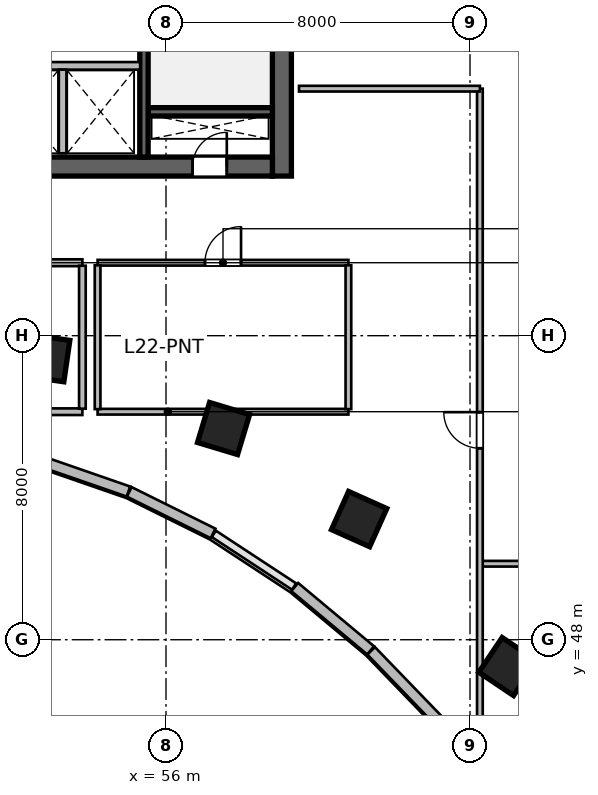
"""IFC4 building model, lengths in metres.
Left out: names, types, materials, properties, quantities, classifications, styles, units other than length and angle.
Written with IfcOpenShell. Run it as: python <this file> out.ifc"""

import sys

from ifc_helpers import new_model, si_unit, direction, frame, frame_2d, origin, origin_2d, place, context, subcontext, project, spatial, rectangle, extrude, source, transform, mapped, element, fill, save


model = new_model("IFC4")
c1 = context("Model", 3, precision=1e-05, world=origin(), true_north=direction((0.0, 1.0)))
c2 = subcontext(c1, "Body", "Model", "MODEL_VIEW")
j1 = project(units=[si_unit("LENGTHUNIT", "METRE"), si_unit("PLANEANGLEUNIT", "RADIAN")], contexts=[c1])
p1 = place(None, origin())
s1 = spatial("IfcSite", under=j1, at=p1, CompositionType="ELEMENT")
p2 = place(p1, origin())
s2 = spatial("IfcBuilding", under=s1, at=p2, CompositionType="ELEMENT")
p3 = place(p2, frame((0.0, 0.0, 96.0)))
s3 = spatial("IfcBuildingStorey", under=s2, at=p3, CompositionType="ELEMENT", Elevation=96.0)
m1 = source(origin(), c2, "Body", "SweptSolid", [
    extrude(rectangle(XDim=12.0, YDim=0.5, at=frame_2d((6.0, 0.0))), origin(), (0.0, 0.0, 1.0), 3.9),
])
p4 = place(p3, frame((59.05, 60.2, 0.0), z_axis=(0.0, 0.0, 1.0), x_axis=(0.0, 1.0, 0.0)))
e1 = element("IfcWall", 1, at=p4, inside=s3, PredefinedType="SHEAR", context=c2, shape_type="MappedRepresentation", body=[
    mapped(m1, transform((0.0, 0.0, 0.0), scale=1.0)),
])
m2 = source(origin(), c2, "Body", "SweptSolid", [
    extrude(rectangle(XDim=21.6, YDim=0.5, at=frame_2d((10.8, 0.0))), origin(), (0.0, 0.0, 1.0), 3.9),
])
p5 = place(p3, frame((37.2, 60.45, 0.0), z_axis=(0.0, 0.0, 1.0), x_axis=(1.0, 0.0, 0.0)))
e2 = element("IfcWall", 2, at=p5, inside=s3, PredefinedType="SHEAR", context=c2, shape_type="MappedRepresentation", body=[
    mapped(m2, transform((0.0, 0.0, 0.0), scale=1.0)),
])
p6 = place(p5, frame((1.1, 0.0, 0.0)))
e3 = element("IfcOpeningElement", 3, at=p6, cuts=e2, PredefinedType="OPENING", context=c2, shape_type="SweptSolid", body=[
    extrude(rectangle(XDim=1.15, YDim=2.15, at=frame_2d((0.575, 1.075))), frame((0.0, 0.26, 0.0), z_axis=(0.0, -1.0, 0.0), x_axis=(1.0, 0.0, 0.0)), (0.0, 0.0, 1.0), 0.52),
])
p7 = place(p5, frame((19.5, 0.0, 0.0)))
e4 = element("IfcOpeningElement", 4, at=p7, cuts=e2, PredefinedType="OPENING", context=c2, shape_type="SweptSolid", body=[
    extrude(rectangle(XDim=0.9, YDim=2.1, at=frame_2d((0.45, 1.05))), frame((0.0, 0.26, 0.0), z_axis=(0.0, -1.0, 0.0), x_axis=(1.0, 0.0, 0.0)), (0.0, 0.0, 1.0), 0.52),
])
p8 = place(p5, frame((12.02, 0.0, 0.0)))
e5 = element("IfcOpeningElement", 5, at=p8, cuts=e2, PredefinedType="OPENING", context=c2, shape_type="SweptSolid", body=[
    extrude(rectangle(XDim=1.6, YDim=2.15, at=frame_2d((0.8, 1.075))), frame((0.0, 0.26, 0.0), z_axis=(0.0, -1.0, 0.0), x_axis=(1.0, 0.0, 0.0)), (0.0, 0.0, 1.0), 0.52),
])
m3 = source(origin(), c2, "Body", "SweptSolid", [
    extrude(rectangle(XDim=3.27, YDim=0.22, at=frame_2d((1.635, 0.0))), origin(), (0.0, 0.0, 1.0), 3.9),
])
p9 = place(p3, frame((55.53, 61.89, 0.0), z_axis=(0.0, 0.0, 1.0), x_axis=(1.0, 0.0, 0.0)))
e6 = element("IfcWall", 6, at=p9, inside=s3, PredefinedType="SHEAR", context=c2, shape_type="MappedRepresentation", body=[
    mapped(m3, transform((0.0, 0.0, 0.0), scale=1.0)),
])
m4 = source(origin(), c2, "Body", "SweptSolid", [
    extrude(rectangle(XDim=11.0, YDim=0.22, at=frame_2d((5.5, 0.0))), origin(), (0.0, 0.0, 1.0), 3.9),
])
p10 = place(p3, frame((55.42, 60.7, 0.0), z_axis=(0.0, 0.0, 1.0), x_axis=(0.0, 1.0, 0.0)))
e7 = element("IfcWall", 7, at=p10, inside=s3, PredefinedType="SHEAR", context=c2, shape_type="MappedRepresentation", body=[
    mapped(m4, transform((0.0, 0.0, 0.0), scale=1.0)),
])
p11 = place(p10, frame((9.545, 0.0, 0.0)))
e8 = element("IfcOpeningElement", 8, at=p11, cuts=e7, PredefinedType="OPENING", context=c2, shape_type="SweptSolid", body=[
    extrude(rectangle(XDim=1.15, YDim=2.15, at=frame_2d((0.575, 1.075))), frame((0.0, 0.12, 0.0), z_axis=(0.0, -1.0, 0.0), x_axis=(1.0, 0.0, 0.0)), (0.0, 0.0, 1.0), 0.24),
])
m5 = source(origin(), c2, "Body", "SweptSolid", [
    extrude(rectangle(XDim=1.1, YDim=1.1, at=origin_2d()), origin(), (0.0, 0.0, 1.0), 3.9),
])
for number, where, z_axis, x_axis in (
    (9, (52.846, 55.411, 0.0), (0.0, 0.0, 1.0), (0.143, 0.99, 0.0)),
    (10, (57.515, 53.558, 0.0), (0.0, 0.0, 1.0), (0.289, 0.957, 0.0)),
    (11, (61.082, 51.175, 0.0), (0.0, 0.0, 1.0), (0.409, 0.912, 0.0)),
    (12, (64.996, 47.294, 0.0), (0.0, 0.0, 1.0), (0.558, 0.83, 0.0)),
):
    element("IfcColumn", number, at=place(p3, frame(where, z_axis=z_axis, x_axis=x_axis)), inside=s3, PredefinedType="COLUMN", context=c2, shape_type="MappedRepresentation", body=[
        mapped(m5, transform((0.0, 0.0, 0.0), scale=1.0)),
    ])
m6 = source(origin(), c2, "Body", "SweptSolid", [
    extrude(rectangle(XDim=2.68, YDim=0.28, at=frame_2d((1.34, 0.0))), origin(), (0.0, 0.0, 1.0), 3.65),
])
p12 = place(p3, frame((63.26, 45.78, 0.0), z_axis=(0.0, 0.0, 1.0), x_axis=(-0.694561996568, 0.719432855049, 0.0)))
e13 = element("IfcWall", 13, at=p12, inside=s3, PredefinedType="SOLIDWALL", context=c2, shape_type="MappedRepresentation", body=[
    mapped(m6, transform((0.0, 0.0, 0.0), scale=1.0)),
])
m7 = source(origin(), c2, "Body", "SweptSolid", [
    extrude(rectangle(XDim=2.601, YDim=0.28, at=frame_2d((1.3, 0.0))), origin(), (0.0, 0.0, 1.0), 3.65),
])
p13 = place(p3, frame((61.385, 47.721, 0.0), z_axis=(0.0, 0.0, 1.0), x_axis=(-0.76796730295, 0.640489048775, 0.0)))
e14 = element("IfcWall", 14, at=p13, inside=s3, PredefinedType="SOLIDWALL", context=c2, shape_type="MappedRepresentation", body=[
    mapped(m7, transform((0.0, 0.0, 0.0), scale=1.0)),
])
m8 = source(origin(), c2, "Body", "SweptSolid", [
    extrude(rectangle(XDim=2.462, YDim=0.28, at=frame_2d((1.231, 0.0))), origin(), (0.0, 0.0, 1.0), 3.65),
])
p14 = place(p3, frame((57.239, 50.797, 0.0), z_axis=(0.0, 0.0, 1.0), x_axis=(-0.8959882207, 0.444077817917, 0.0)))
e15 = element("IfcWall", 15, at=p14, inside=s3, PredefinedType="SOLIDWALL", context=c2, shape_type="MappedRepresentation", body=[
    mapped(m8, transform((0.0, 0.0, 0.0), scale=1.0)),
])
m9 = source(origin(), c2, "Body", "SweptSolid", [
    extrude(rectangle(XDim=2.411, YDim=0.28, at=frame_2d((1.205, 0.0))), origin(), (0.0, 0.0, 1.0), 3.65),
])
p15 = place(p3, frame((55.012, 51.899, 0.0), z_axis=(0.0, 0.0, 1.0), x_axis=(-0.944880068161, 0.327416640982, 0.0)))
e16 = element("IfcWall", 16, at=p15, inside=s3, PredefinedType="SOLIDWALL", context=c2, shape_type="MappedRepresentation", body=[
    mapped(m9, transform((0.0, 0.0, 0.0), scale=1.0)),
])
m10 = source(origin(), c2, "Body", "SweptSolid", [
    extrude(rectangle(XDim=4.1, YDim=0.2, at=frame_2d((2.05, 0.0))), origin(), (0.0, 0.0, 1.0), 3.65),
])
p16 = place(p3, frame((51.22, 63.1, 0.0), z_axis=(0.0, 0.0, 1.0), x_axis=(1.0, 0.0, 0.0)))
e17 = element("IfcWall", 17, at=p16, inside=s3, PredefinedType="SOLIDWALL", context=c2, shape_type="MappedRepresentation", body=[
    mapped(m10, transform((0.0, 0.0, 0.0), scale=1.0)),
])
m11 = source(origin(), c2, "Body", "SweptSolid", [
    extrude(rectangle(XDim=2.2, YDim=0.2, at=frame_2d((1.1, 0.0))), origin(), (0.0, 0.0, 1.0), 3.65),
])
p17 = place(p3, frame((53.28, 60.8, 0.0), z_axis=(0.0, 0.0, 1.0), x_axis=(0.0, 1.0, 0.0)))
e18 = element("IfcWall", 18, at=p17, inside=s3, PredefinedType="SOLIDWALL", context=c2, shape_type="MappedRepresentation", body=[
    mapped(m11, transform((0.0, 0.0, 0.0), scale=1.0)),
])
m12 = source(origin(), c2, "Body", "SweptSolid", [
    extrude(rectangle(XDim=3.248, YDim=0.175, at=frame_2d((1.624, 0.0))), origin(), (0.0, 0.0, 1.0), 3.65),
])
p18 = place(p3, frame((50.552, 54.0, 0.0), z_axis=(0.0, 0.0, 1.0), x_axis=(1.0, 0.0, 0.0)))
e19 = element("IfcWall", 19, at=p18, inside=s3, PredefinedType="PARTITIONING", context=c2, shape_type="MappedRepresentation", body=[
    mapped(m12, transform((0.0, 0.0, 0.0), scale=1.0)),
])
m13 = source(origin(), c2, "Body", "SweptSolid", [
    extrude(rectangle(XDim=3.248, YDim=0.18, at=frame_2d((1.624, 0.0))), origin(), (0.0, 0.0, 1.0), 3.65),
])
p19 = place(p3, frame((50.552, 57.92, 0.0), z_axis=(0.0, 0.0, 1.0), x_axis=(1.0, 0.0, 0.0)))
e20 = element("IfcWall", 20, at=p19, inside=s3, PredefinedType="PLUMBINGWALL", context=c2, shape_type="MappedRepresentation", body=[
    mapped(m13, transform((0.0, 0.0, 0.0), scale=1.0)),
])
p20 = place(p19, frame((1.149, 0.0, 0.0)))
e21 = element("IfcOpeningElement", 21, at=p20, cuts=e20, PredefinedType="OPENING", context=c2, shape_type="SweptSolid", body=[
    extrude(rectangle(XDim=0.95, YDim=2.12, at=frame_2d((0.475, 1.06))), frame((0.0, 0.1, 0.0), z_axis=(0.0, -1.0, 0.0), x_axis=(1.0, 0.0, 0.0)), (0.0, 0.0, 1.0), 0.2),
])
m14 = source(origin(), c2, "Body", "SweptSolid", [
    extrude(rectangle(XDim=3.763, YDim=0.175, at=frame_2d((1.881, 0.0))), origin(), (0.0, 0.0, 1.0), 3.65),
])
p21 = place(p3, frame((53.8, 54.079, 0.0), z_axis=(0.0, 0.0, 1.0), x_axis=(0.0, 1.0, 0.0)))
e22 = element("IfcWall", 22, at=p21, inside=s3, PredefinedType="PARTITIONING", context=c2, shape_type="MappedRepresentation", body=[
    mapped(m14, transform((0.0, 0.0, 0.0), scale=1.0)),
])
m15 = source(origin(), c2, "Body", "SweptSolid", [
    extrude(rectangle(XDim=6.6, YDim=0.15, at=frame_2d((3.3, 0.0))), origin(), (0.0, 0.0, 1.0), 3.095),
])
p22 = place(p3, frame((54.2, 54.0, 0.0), z_axis=(0.0, 0.0, 1.0), x_axis=(1.0, 0.0, 0.0)))
e23 = element("IfcWall", 23, at=p22, inside=s3, PredefinedType="PARTITIONING", context=c2, shape_type="MappedRepresentation", body=[
    mapped(m15, transform((0.0, 0.0, 0.0), scale=1.0)),
])
m16 = source(origin(), c2, "Body", "SweptSolid", [
    extrude(rectangle(XDim=6.6, YDim=0.15, at=frame_2d((3.3, 0.0))), origin(), (0.0, 0.0, 1.0), 3.65),
])
p23 = place(p3, frame((54.2, 57.92, 0.0), z_axis=(0.0, 0.0, 1.0), x_axis=(1.0, 0.0, 0.0)))
e24 = element("IfcWall", 24, at=p23, inside=s3, PredefinedType="PARTITIONING", context=c2, shape_type="MappedRepresentation", body=[
    mapped(m16, transform((0.0, 0.0, 0.0), scale=1.0)),
])
p24 = place(p23, frame((2.825, 0.0, 0.0)))
e25 = element("IfcOpeningElement", 25, at=p24, cuts=e24, PredefinedType="OPENING", context=c2, shape_type="SweptSolid", body=[
    extrude(rectangle(XDim=0.95, YDim=2.1, at=frame_2d((0.475, 1.05))), frame((0.0, 0.085, 0.0), z_axis=(0.0, -1.0, 0.0), x_axis=(1.0, 0.0, 0.0)), (0.0, 0.0, 1.0), 0.17),
])
m17 = source(origin(), c2, "Body", "SweptSolid", [
    extrude(rectangle(XDim=3.785, YDim=0.15, at=frame_2d((1.893, 0.0))), origin(), (0.0, 0.0, 1.0), 3.65),
])
for number, where, z_axis, x_axis in (
    (26, (54.2, 54.067, 0.0), (0.0, 0.0, 1.0), (0.0, 1.0, 0.0)),
    (27, (60.8, 54.067, 0.0), (0.0, 0.0, 1.0), (0.0, 1.0, 0.0)),
):
    element("IfcWall", number, at=place(p3, frame(where, z_axis=z_axis, x_axis=x_axis)), inside=s3, PredefinedType="PARTITIONING", context=c2, shape_type="MappedRepresentation", body=[
        mapped(m17, transform((0.0, 0.0, 0.0), scale=1.0)),
    ])
m18 = source(origin(), c2, "Body", "SweptSolid", [
    extrude(rectangle(XDim=2.5, YDim=0.15, at=frame_2d((1.25, 0.0))), origin(), (0.0, 0.0, 1.0), 3.65),
])
p25 = place(p3, frame((64.3, 50.0, 0.0), z_axis=(0.0, 0.0, 1.0), x_axis=(1.0, 0.0, 0.0)))
e28 = element("IfcWall", 28, at=p25, inside=s3, PredefinedType="PARTITIONING", context=c2, shape_type="MappedRepresentation", body=[
    mapped(m18, transform((0.0, 0.0, 0.0), scale=1.0)),
])
m19 = source(origin(), c2, "Body", "SweptSolid", [
    extrude(rectangle(XDim=17.974, YDim=0.15, at=frame_2d((8.987, 0.0))), origin(), (0.0, 0.0, 1.0), 2.942),
])
p26 = place(p3, frame((64.26, 44.526, 0.0), z_axis=(0.0, 0.0, 1.0), x_axis=(0.0, 1.0, 0.0)))
e29 = element("IfcWall", 29, at=p26, inside=s3, PredefinedType="PARTITIONING", context=c2, shape_type="MappedRepresentation", body=[
    mapped(m19, transform((0.0, 0.0, 0.0), scale=1.0)),
])
p27 = place(p26, frame((8.512, 0.0, 0.0)))
e30 = element("IfcOpeningElement", 30, at=p27, cuts=e29, PredefinedType="OPENING", context=c2, shape_type="SweptSolid", body=[
    extrude(rectangle(XDim=0.95, YDim=2.1, at=frame_2d((0.475, 1.05))), frame((0.0, 0.085, 0.0), z_axis=(0.0, -1.0, 0.0), x_axis=(1.0, 0.0, 0.0)), (0.0, 0.0, 1.0), 0.17),
])
m20 = source(origin(), c2, "Body", "SweptSolid", [
    extrude(rectangle(XDim=4.76, YDim=0.15, at=frame_2d((2.38, 0.0))), origin(), (0.0, 0.0, 1.0), 3.65),
])
p28 = place(p3, frame((59.5, 62.5, 0.0), z_axis=(0.0, 0.0, 1.0), x_axis=(1.0, 0.0, 0.0)))
e31 = element("IfcWall", 31, at=p28, inside=s3, PredefinedType="PARTITIONING", context=c2, shape_type="MappedRepresentation", body=[
    mapped(m20, transform((0.0, 0.0, 0.0), scale=1.0)),
])
m21 = source(origin(), c2, "Body", "SweptSolid", [
    extrude(rectangle(XDim=0.9, YDim=2.1, at=frame_2d((0.45, 1.05))), frame((0.0, 0.025, 0.0), z_axis=(0.0, -1.0, 0.0), x_axis=(1.0, 0.0, 0.0)), (0.0, 0.0, 1.0), 0.05),
])
p29 = place(p7, origin())
e32 = element("IfcDoor", 32, at=p29, inside=s3, OperationType="SINGLE_SWING_RIGHT", PredefinedType="DOOR", context=c2, shape_type="MappedRepresentation", body=[
    mapped(m21, transform((0.0, 0.0, 0.0), scale=1.0)),
])
fill(e4, e32)
m22 = source(origin(), c2, "Body", "SweptSolid", [
    extrude(rectangle(XDim=0.95, YDim=2.1, at=frame_2d((0.475, 1.05))), frame((0.0, 0.025, 0.0), z_axis=(0.0, -1.0, 0.0), x_axis=(1.0, 0.0, 0.0)), (0.0, 0.0, 1.0), 0.05),
])
p30 = place(p24, origin())
e33 = element("IfcDoor", 33, at=p30, inside=s3, OperationType="SINGLE_SWING_RIGHT", PredefinedType="DOOR", context=c2, shape_type="MappedRepresentation", body=[
    mapped(m22, transform((0.0, 0.0, 0.0), scale=1.0)),
])
fill(e25, e33)
p31 = place(p27, origin())
e34 = element("IfcDoor", 34, at=p31, inside=s3, OperationType="SINGLE_SWING_RIGHT", PredefinedType="DOOR", context=c2, shape_type="MappedRepresentation", body=[
    mapped(m22, transform((0.0, 0.0, 0.0), scale=1.0)),
])
fill(e30, e34)
save(model, sys.argv[1])
